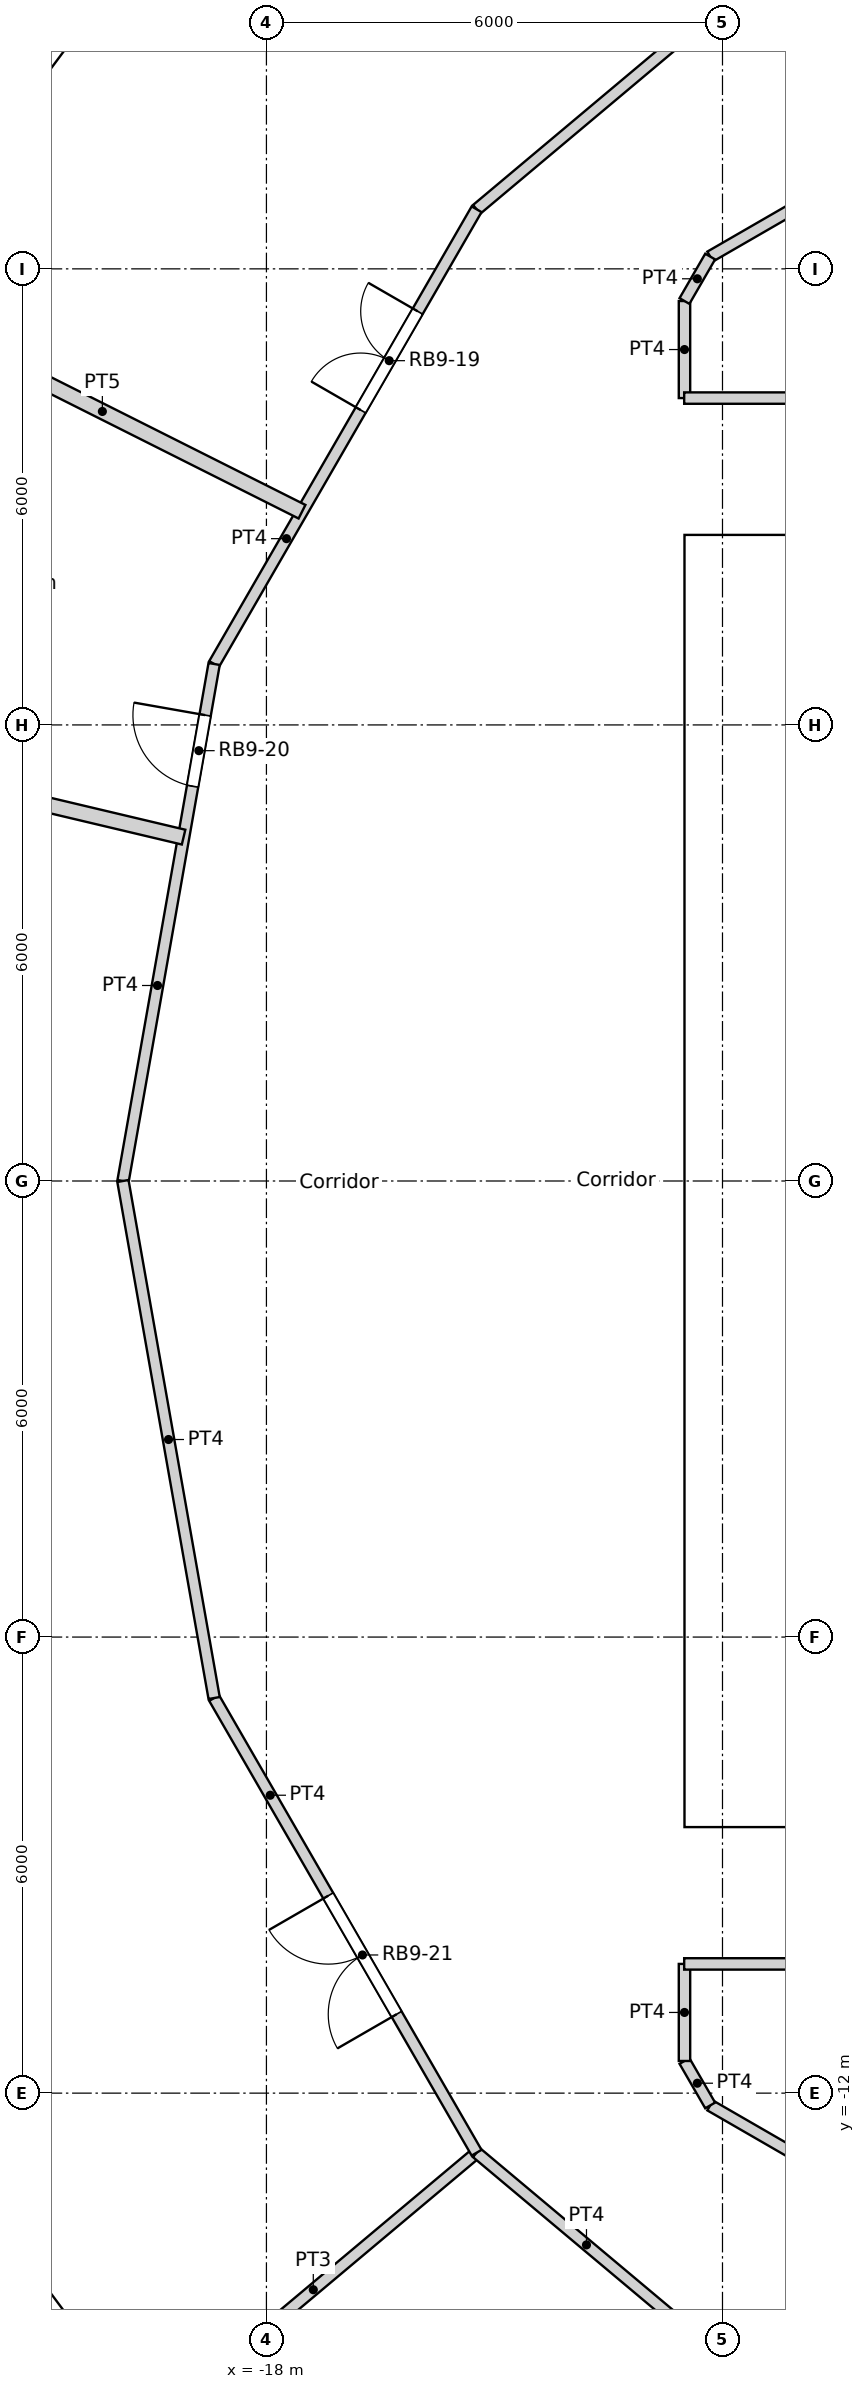
"""IFC4 building model, lengths in metres.
Left out: names, types, materials, properties, quantities, classifications, styles, units other than length and angle.
Written with IfcOpenShell. Run it as: python <this file> out.ifc"""

import sys

from ifc_helpers import new_model, si_unit, direction, frame, frame_2d, origin, origin_2d, place, context, subcontext, project, spatial, rectangle, circle, extrude, element, fill, save


model = new_model("IFC4")
c1 = context("Model", 3, precision=1e-05, world=origin(), true_north=direction((0.0, 1.0)))
c2 = subcontext(c1, "Body", "Model", "MODEL_VIEW")
j1 = project(units=[si_unit("LENGTHUNIT", "METRE"), si_unit("PLANEANGLEUNIT", "RADIAN")], contexts=[c1])
p1 = place(None, origin())
s1 = spatial("IfcSite", under=j1, at=p1, CompositionType="ELEMENT")
p2 = place(p1, origin())
s2 = spatial("IfcBuilding", under=s1, at=p2, CompositionType="ELEMENT")
p3 = place(p2, frame((0.0, 0.0, 212.4)))
s3 = spatial("IfcBuildingStorey", under=s2, at=p3, CompositionType="ELEMENT", Elevation=212.4)
for number, where, z_axis, x_axis in (
    (1, (-20.509, 13.489, 0.0), (0.0, 0.0, 1.0), (1.0, 0.0, 0.0)),
    (2, (-20.509, -13.489, 0.0), (0.0, 0.0, 1.0), (1.0, 0.0, 0.0)),
):
    element("IfcColumn", number, at=place(p3, frame(where, z_axis=z_axis, x_axis=x_axis)), inside=s3, PredefinedType="COLUMN", context=c2, shape_type="SweptSolid", body=[
        extrude(circle(Radius=0.6, at=origin_2d()), origin(), (0.0, 0.0, 1.0), 3.6),
    ])
for number, where, z_axis, x_axis in (
    (3, (-13.798, 12.802, 0.0), (0.0, 0.0, 1.0), (1.0, 0.0, 0.0)),
    (4, (-16.958, 8.167, 0.0), (0.0, 0.0, 1.0), (1.0, 0.0, 0.0)),
    (5, (-18.612, 2.805, 0.0), (0.0, 0.0, 1.0), (1.0, 0.0, 0.0)),
    (6, (-18.612, -2.805, 0.0), (0.0, 0.0, 1.0), (1.0, 0.0, 0.0)),
    (7, (-16.958, -8.167, 0.0), (0.0, 0.0, 1.0), (1.0, 0.0, 0.0)),
    (8, (-13.798, -12.802, 0.0), (0.0, 0.0, 1.0), (1.0, 0.0, 0.0)),
):
    element("IfcColumn", number, at=place(p3, frame(where, z_axis=z_axis, x_axis=x_axis)), inside=s3, PredefinedType="COLUMN", context=c2, shape_type="SweptSolid", body=[
        extrude(circle(Radius=0.65, at=origin_2d()), origin(), (0.0, 0.0, 1.0), 3.6),
    ])
p4 = place(p3, frame((-19.647, 16.486, 0.0), z_axis=(0.0, 0.0, 1.0), x_axis=(-0.597197580538, -0.80209416517, 0.0)))
e9 = element("IfcWall", 9, at=p4, inside=s3, PredefinedType="SOLIDWALL", context=c2, shape_type="SweptSolid", body=[
    extrude(rectangle(XDim=2.973, YDim=0.3, at=frame_2d((1.486, 0.0))), origin(), (0.0, 0.0, 1.0), 3.3),
])
p5 = place(p4, frame((1.486, 0.0, 1.55)))
e10 = element("IfcOpeningElement", 10, at=p5, cuts=e9, PredefinedType="OPENING", context=c2, shape_type="SweptSolid", body=[
    extrude(circle(Radius=0.9, at=origin_2d()), frame((0.0, 0.16, 0.0), z_axis=(0.0, -1.0, 0.0), x_axis=(1.0, 0.0, 0.0)), (0.0, 0.0, 1.0), 0.32),
])
p6 = place(p3, frame((-21.422, -14.101, 0.0), z_axis=(0.0, 0.0, 1.0), x_axis=(0.597197580538, -0.80209416517, 0.0)))
e11 = element("IfcWall", 11, at=p6, inside=s3, PredefinedType="SOLIDWALL", context=c2, shape_type="SweptSolid", body=[
    extrude(rectangle(XDim=2.973, YDim=0.3, at=frame_2d((1.486, 0.0))), origin(), (0.0, 0.0, 1.0), 3.3),
])
p7 = place(p6, frame((1.486, 0.0, 1.55)))
e12 = element("IfcOpeningElement", 12, at=p7, cuts=e11, PredefinedType="OPENING", context=c2, shape_type="SweptSolid", body=[
    extrude(circle(Radius=0.9, at=origin_2d()), frame((0.0, 0.16, 0.0), z_axis=(0.0, -1.0, 0.0), x_axis=(1.0, 0.0, 0.0)), (0.0, 0.0, 1.0), 0.32),
])
p8 = place(p3, frame((-12.5, -8.05, 0.0), z_axis=(0.0, 0.0, 1.0), x_axis=(1.0, 0.0, 0.0)))
e13 = element("IfcWall", 13, at=p8, inside=s3, PredefinedType="SOLIDWALL", context=c2, shape_type="SweptSolid", body=[
    extrude(rectangle(XDim=25.0, YDim=0.9, at=frame_2d((12.5, 0.0))), origin(), (0.0, 0.0, 1.0), 3.6),
])
p9 = place(p8, frame((13.4, 0.0, 0.0)))
e14 = element("IfcOpeningElement", 14, at=p9, cuts=e13, PredefinedType="OPENING", context=c2, shape_type="SweptSolid", body=[
    extrude(rectangle(XDim=1.0, YDim=2.1, at=frame_2d((0.5, 1.05))), frame((0.0, 0.45, 0.0), z_axis=(0.0, -1.0, 0.0), x_axis=(1.0, 0.0, 0.0)), (0.0, 0.0, 1.0), 0.9),
])
p10 = place(p8, frame((8.3, 0.0, 0.0)))
e15 = element("IfcOpeningElement", 15, at=p10, cuts=e13, PredefinedType="OPENING", context=c2, shape_type="SweptSolid", body=[
    extrude(rectangle(XDim=1.8, YDim=2.1, at=frame_2d((0.9, 1.05))), frame((0.0, 0.45, 0.0), z_axis=(0.0, -1.0, 0.0), x_axis=(1.0, 0.0, 0.0)), (0.0, 0.0, 1.0), 0.9),
])
p11 = place(p8, frame((14.9, 0.0, 0.0)))
e16 = element("IfcOpeningElement", 16, at=p11, cuts=e13, PredefinedType="OPENING", context=c2, shape_type="SweptSolid", body=[
    extrude(rectangle(XDim=1.8, YDim=2.1, at=frame_2d((0.9, 1.05))), frame((0.0, 0.45, 0.0), z_axis=(0.0, -1.0, 0.0), x_axis=(1.0, 0.0, 0.0)), (0.0, 0.0, 1.0), 0.9),
])
p12 = place(p3, frame((-12.5, 8.05, 0.0), z_axis=(0.0, 0.0, 1.0), x_axis=(1.0, 0.0, 0.0)))
e17 = element("IfcWall", 17, at=p12, inside=s3, PredefinedType="SOLIDWALL", context=c2, shape_type="SweptSolid", body=[
    extrude(rectangle(XDim=25.0, YDim=0.9, at=frame_2d((12.5, 0.0))), origin(), (0.0, 0.0, 1.0), 3.6),
])
p13 = place(p12, frame((8.3, 0.0, 0.0)))
e18 = element("IfcOpeningElement", 18, at=p13, cuts=e17, PredefinedType="OPENING", context=c2, shape_type="SweptSolid", body=[
    extrude(rectangle(XDim=1.8, YDim=2.1, at=frame_2d((0.9, 1.05))), frame((0.0, 0.45, 0.0), z_axis=(0.0, -1.0, 0.0), x_axis=(1.0, 0.0, 0.0)), (0.0, 0.0, 1.0), 0.9),
])
p14 = place(p3, frame((-12.05, -7.6, 0.0), z_axis=(0.0, 0.0, 1.0), x_axis=(0.0, 1.0, 0.0)))
e19 = element("IfcWall", 19, at=p14, inside=s3, PredefinedType="SOLIDWALL", context=c2, shape_type="SweptSolid", body=[
    extrude(rectangle(XDim=15.2, YDim=0.9, at=frame_2d((7.6, 0.0))), origin(), (0.0, 0.0, 1.0), 3.6),
])
p15 = place(p14, frame((7.1, 0.0, 0.0)))
e20 = element("IfcOpeningElement", 20, at=p15, cuts=e19, PredefinedType="OPENING", context=c2, shape_type="SweptSolid", body=[
    extrude(rectangle(XDim=1.0, YDim=2.1, at=frame_2d((0.5, 1.05))), frame((0.0, 0.45, 0.0), z_axis=(0.0, -1.0, 0.0), x_axis=(1.0, 0.0, 0.0)), (0.0, 0.0, 1.0), 0.9),
])
p16 = place(p3, frame((-11.6, -4.55, 0.0), z_axis=(0.0, 0.0, 1.0), x_axis=(1.0, 0.0, 0.0)))
e21 = element("IfcWall", 21, at=p16, inside=s3, PredefinedType="SOLIDWALL", context=c2, shape_type="SweptSolid", body=[
    extrude(rectangle(XDim=2.4, YDim=0.3, at=frame_2d((1.2, 0.0))), origin(), (0.0, 0.0, 1.0), 3.3),
])
p17 = place(p16, frame((0.65, 0.0, 0.0)))
e22 = element("IfcOpeningElement", 22, at=p17, cuts=e21, PredefinedType="OPENING", context=c2, shape_type="SweptSolid", body=[
    extrude(rectangle(XDim=1.1, YDim=2.1, at=frame_2d((0.55, 1.05))), frame((0.0, 0.15, 0.0), z_axis=(0.0, -1.0, 0.0), x_axis=(1.0, 0.0, 0.0)), (0.0, 0.0, 1.0), 0.3),
])
p18 = place(p3, frame((-11.6, 4.55, 0.0), z_axis=(0.0, 0.0, 1.0), x_axis=(1.0, 0.0, 0.0)))
e23 = element("IfcWall", 23, at=p18, inside=s3, PredefinedType="SOLIDWALL", context=c2, shape_type="SweptSolid", body=[
    extrude(rectangle(XDim=2.4, YDim=0.3, at=frame_2d((1.2, 0.0))), origin(), (0.0, 0.0, 1.0), 3.3),
])
p19 = place(p18, frame((0.65, 0.0, 0.0)))
e24 = element("IfcOpeningElement", 24, at=p19, cuts=e23, PredefinedType="OPENING", context=c2, shape_type="SweptSolid", body=[
    extrude(rectangle(XDim=1.1, YDim=2.1, at=frame_2d((0.55, 1.05))), frame((0.0, 0.15, 0.0), z_axis=(0.0, -1.0, 0.0), x_axis=(1.0, 0.0, 0.0)), (0.0, 0.0, 1.0), 0.3),
])
for number, where, z_axis, x_axis in (
    (25, (-12.504, 10.3, 0.0), (0.0, 0.0, 1.0), (1.0, 0.0, 0.0)),
    (26, (-12.504, -10.3, 0.0), (0.0, 0.0, 1.0), (1.0, 0.0, 0.0)),
):
    element("IfcWall", number, at=place(p3, frame(where, z_axis=z_axis, x_axis=x_axis)), inside=s3, PredefinedType="PARTITIONING", context=c2, shape_type="SweptSolid", body=[
        extrude(rectangle(XDim=7.687, YDim=0.15, at=frame_2d((3.844, 0.0))), origin(), (0.0, 0.0, 1.0), 3.15),
    ])
p20 = place(p3, frame((-12.162, 12.162, 0.0), z_axis=(0.0, 0.0, 1.0), x_axis=(0.866004766557, 0.500035743023, 0.0)))
e27 = element("IfcWall", 27, at=p20, inside=s3, PredefinedType="PARTITIONING", context=c2, shape_type="SweptSolid", body=[
    extrude(rectangle(XDim=8.477, YDim=0.15, at=frame_2d((4.239, 0.0))), origin(), (0.0, 0.0, 1.0), 3.15),
])
p21 = place(p20, frame((3.739, 0.0, 0.0)))
e28 = element("IfcOpeningElement", 28, at=p21, cuts=e27, PredefinedType="OPENING", context=c2, shape_type="SweptSolid", body=[
    extrude(rectangle(XDim=1.0, YDim=2.04, at=frame_2d((0.5, 1.02))), frame((0.0, 0.075, 0.0), z_axis=(0.0, -1.0, 0.0), x_axis=(1.0, 0.0, 0.0)), (0.0, 0.0, 1.0), 0.15),
])
p22 = place(p3, frame((-15.234, 12.783, 0.0), z_axis=(0.0, 0.0, 1.0), x_axis=(0.765936018543, 0.642916802937, 0.0)))
e29 = element("IfcWall", 29, at=p22, inside=s3, PredefinedType="PARTITIONING", context=c2, shape_type="SweptSolid", body=[
    extrude(rectangle(XDim=6.906, YDim=0.15, at=frame_2d((3.453, 0.0))), origin(), (0.0, 0.0, 1.0), 3.15),
])
p23 = place(p3, frame((-12.5, 11.577, 0.0), z_axis=(0.0, 0.0, 1.0), x_axis=(0.500024767483, 0.866011103799, 0.0)))
e30 = element("IfcWall", 30, at=p23, inside=s3, PredefinedType="PARTITIONING", context=c2, shape_type="SweptSolid", body=[
    extrude(rectangle(XDim=0.676, YDim=0.15, at=frame_2d((0.338, 0.0))), origin(), (0.0, 0.0, 1.0), 3.15),
])
for number, where, z_axis, x_axis in (
    (31, (-12.5, 10.3, 0.0), (0.0, 0.0, 1.0), (0.0, 1.0, 0.0)),
    (32, (-12.5, -11.577, 0.0), (0.0, 0.0, 1.0), (0.0, 1.0, 0.0)),
):
    element("IfcWall", number, at=place(p3, frame(where, z_axis=z_axis, x_axis=x_axis)), inside=s3, PredefinedType="PARTITIONING", context=c2, shape_type="SweptSolid", body=[
        extrude(rectangle(XDim=1.277, YDim=0.15, at=frame_2d((0.638, 0.0))), origin(), (0.0, 0.0, 1.0), 3.15),
    ])
p24 = place(p3, frame((-12.5, -11.577, 0.0), z_axis=(0.0, 0.0, 1.0), x_axis=(0.500024767483, -0.866011103799, 0.0)))
e33 = element("IfcWall", 33, at=p24, inside=s3, PredefinedType="PARTITIONING", context=c2, shape_type="SweptSolid", body=[
    extrude(rectangle(XDim=0.676, YDim=0.15, at=frame_2d((0.338, 0.0))), origin(), (0.0, 0.0, 1.0), 3.15),
])
p25 = place(p3, frame((-18.688, 6.802, 0.0), z_axis=(0.0, 0.0, 1.0), x_axis=(0.499914202267, 0.866074933462, 0.0)))
e34 = element("IfcWall", 34, at=p25, inside=s3, PredefinedType="PARTITIONING", context=c2, shape_type="SweptSolid", body=[
    extrude(rectangle(XDim=6.907, YDim=0.15, at=frame_2d((3.454, 0.0))), origin(), (0.0, 0.0, 1.0), 3.15),
])
p26 = place(p25, frame((3.857, 0.0, 0.0)))
e35 = element("IfcOpeningElement", 35, at=p26, cuts=e34, PredefinedType="OPENING", context=c2, shape_type="SweptSolid", body=[
    extrude(rectangle(XDim=1.5, YDim=2.1, at=frame_2d((0.75, 1.05))), frame((0.0, 0.075, 0.0), z_axis=(0.0, -1.0, 0.0), x_axis=(1.0, 0.0, 0.0)), (0.0, 0.0, 1.0), 0.15),
])
p27 = place(p3, frame((-19.886, -0.0, 0.0), z_axis=(0.0, 0.0, 1.0), x_axis=(0.173482860149, 0.984836888644, 0.0)))
e36 = element("IfcWall", 36, at=p27, inside=s3, PredefinedType="PARTITIONING", context=c2, shape_type="SweptSolid", body=[
    extrude(rectangle(XDim=6.907, YDim=0.15, at=frame_2d((3.454, 0.0))), origin(), (0.0, 0.0, 1.0), 3.15),
])
p28 = place(p27, frame((5.274, 0.0, 0.0)))
e37 = element("IfcOpeningElement", 37, at=p28, cuts=e36, PredefinedType="OPENING", context=c2, shape_type="SweptSolid", body=[
    extrude(rectangle(XDim=0.95, YDim=2.1, at=frame_2d((0.475, 1.05))), frame((0.0, 0.075, 0.0), z_axis=(0.0, -1.0, 0.0), x_axis=(1.0, 0.0, 0.0)), (0.0, 0.0, 1.0), 0.15),
])
p29 = place(p3, frame((-18.688, -6.802, 0.0), z_axis=(0.0, 0.0, 1.0), x_axis=(0.499914202267, -0.866074933462, 0.0)))
e38 = element("IfcWall", 38, at=p29, inside=s3, PredefinedType="PARTITIONING", context=c2, shape_type="SweptSolid", body=[
    extrude(rectangle(XDim=6.907, YDim=0.15, at=frame_2d((3.454, 0.0))), origin(), (0.0, 0.0, 1.0), 3.15),
])
p30 = place(p29, frame((3.003, 0.0, 0.0)))
e39 = element("IfcOpeningElement", 39, at=p30, cuts=e38, PredefinedType="OPENING", context=c2, shape_type="SweptSolid", body=[
    extrude(rectangle(XDim=1.8, YDim=2.1, at=frame_2d((0.9, 1.05))), frame((0.0, 0.075, 0.0), z_axis=(0.0, -1.0, 0.0), x_axis=(1.0, 0.0, 0.0)), (0.0, 0.0, 1.0), 0.15),
])
p31 = place(p3, frame((-19.888, 0.0, 0.0), z_axis=(0.0, 0.0, 1.0), x_axis=(0.173728873845, -0.98479352069, 0.0)))
e40 = element("IfcWall", 40, at=p31, inside=s3, PredefinedType="PARTITIONING", context=c2, shape_type="SweptSolid", body=[
    extrude(rectangle(XDim=6.907, YDim=0.15, at=frame_2d((3.454, 0.0))), origin(), (0.0, 0.0, 1.0), 3.15),
])
p32 = place(p3, frame((-15.235, -12.784, 0.0), z_axis=(0.0, 0.0, 1.0), x_axis=(0.766192104565, -0.642611592567, 0.0)))
e41 = element("IfcWall", 41, at=p32, inside=s3, PredefinedType="PARTITIONING", context=c2, shape_type="SweptSolid", body=[
    extrude(rectangle(XDim=6.906, YDim=0.15, at=frame_2d((3.453, 0.0))), origin(), (0.0, 0.0, 1.0), 3.15),
])
p33 = place(p32, frame((3.823, 0.0, 0.0)))
e42 = element("IfcOpeningElement", 42, at=p33, cuts=e41, PredefinedType="OPENING", context=c2, shape_type="SweptSolid", body=[
    extrude(rectangle(XDim=1.0, YDim=2.04, at=frame_2d((0.5, 1.02))), frame((0.0, 0.075, 0.0), z_axis=(0.0, -1.0, 0.0), x_axis=(1.0, 0.0, 0.0)), (0.0, 0.0, 1.0), 0.15),
])
p34 = place(p3, frame((-12.162, -12.162, 0.0), z_axis=(0.0, 0.0, 1.0), x_axis=(0.866004766557, -0.500035743023, 0.0)))
e43 = element("IfcWall", 43, at=p34, inside=s3, PredefinedType="PARTITIONING", context=c2, shape_type="SweptSolid", body=[
    extrude(rectangle(XDim=8.477, YDim=0.15, at=frame_2d((4.239, 0.0))), origin(), (0.0, 0.0, 1.0), 3.15),
])
p35 = place(p34, frame((3.763, 0.0, 0.0)))
e44 = element("IfcOpeningElement", 44, at=p35, cuts=e43, PredefinedType="OPENING", context=c2, shape_type="SweptSolid", body=[
    extrude(rectangle(XDim=0.95, YDim=2.1, at=frame_2d((0.475, 1.05))), frame((0.0, 0.075, 0.0), z_axis=(0.0, -1.0, 0.0), x_axis=(1.0, 0.0, 0.0)), (0.0, 0.0, 1.0), 0.15),
])
p36 = place(p3, frame((-22.785, 11.443, 0.0), z_axis=(0.0, 0.0, 1.0), x_axis=(0.893628331628, -0.448807759415, 0.0)))
e45 = element("IfcWall", 45, at=p36, inside=s3, PredefinedType="PARTITIONING", context=c2, shape_type="SweptSolid", body=[
    extrude(rectangle(XDim=5.878, YDim=0.2, at=frame_2d((2.939, 0.0))), origin(), (0.0, 0.0, 1.0), 3.15),
])
p37 = place(p3, frame((-24.81, 5.88, 0.0), z_axis=(0.0, 0.0, 1.0), x_axis=(0.973033452951, -0.230664040193, 0.0)))
e46 = element("IfcWall", 46, at=p37, inside=s3, PredefinedType="PARTITIONING", context=c2, shape_type="SweptSolid", body=[
    extrude(rectangle(XDim=5.878, YDim=0.2, at=frame_2d((2.939, 0.0))), origin(), (0.0, 0.0, 1.0), 3.15),
])
p38 = place(p3, frame((-19.532, -16.389, 0.0), z_axis=(0.0, 0.0, 1.0), x_axis=(0.76609059793, 0.642732600514, 0.0)))
e47 = element("IfcWall", 47, at=p38, inside=s3, PredefinedType="PARTITIONING", context=c2, shape_type="SweptSolid", body=[
    extrude(rectangle(XDim=5.609, YDim=0.15, at=frame_2d((2.804, 0.0))), origin(), (0.0, 0.0, 1.0), 3.15),
])
p39 = place(p5, origin())
e48 = element("IfcWindow", 48, at=p39, inside=s3, PartitioningType="SINGLE_PANEL", PredefinedType="WINDOW", context=c2, shape_type="SweptSolid", body=[
    extrude(circle(Radius=0.9, at=origin_2d()), frame((0.0, 0.12, 0.0), z_axis=(0.0, -1.0, 0.0), x_axis=(1.0, 0.0, 0.0)), (0.0, 0.0, 1.0), 0.1),
])
fill(e10, e48)
p40 = place(p7, origin())
e49 = element("IfcWindow", 49, at=p40, inside=s3, PartitioningType="SINGLE_PANEL", PredefinedType="WINDOW", context=c2, shape_type="SweptSolid", body=[
    extrude(circle(Radius=0.9, at=origin_2d()), frame((0.0, 0.12, 0.0), z_axis=(0.0, -1.0, 0.0), x_axis=(1.0, 0.0, 0.0)), (0.0, 0.0, 1.0), 0.1),
])
fill(e12, e49)
p41 = place(p15, origin())
e50 = element("IfcDoor", 50, at=p41, inside=s3, OperationType="DOUBLE_DOOR_SINGLE_SWING", PredefinedType="DOOR", context=c2, shape_type="SweptSolid", body=[
    extrude(rectangle(XDim=1.0, YDim=2.1, at=frame_2d((0.5, 1.05))), frame((0.0, 0.025, 0.0), z_axis=(0.0, -1.0, 0.0), x_axis=(1.0, 0.0, 0.0)), (0.0, 0.0, 1.0), 0.05),
])
fill(e20, e50)
p42 = place(p26, origin())
e51 = element("IfcDoor", 51, at=p42, inside=s3, OperationType="DOUBLE_DOOR_SINGLE_SWING", PredefinedType="DOOR", context=c2, shape_type="SweptSolid", body=[
    extrude(rectangle(XDim=1.5, YDim=2.1, at=frame_2d((0.75, 1.05))), frame((0.0, 0.025, 0.0), z_axis=(0.0, -1.0, 0.0), x_axis=(1.0, 0.0, 0.0)), (0.0, 0.0, 1.0), 0.05),
])
fill(e35, e51)
p43 = place(p28, origin())
e52 = element("IfcDoor", 52, at=p43, inside=s3, OperationType="SINGLE_SWING_RIGHT", PredefinedType="DOOR", context=c2, shape_type="SweptSolid", body=[
    extrude(rectangle(XDim=0.95, YDim=2.1, at=frame_2d((0.475, 1.05))), frame((0.0, 0.025, 0.0), z_axis=(0.0, -1.0, 0.0), x_axis=(1.0, 0.0, 0.0)), (0.0, 0.0, 1.0), 0.05),
])
fill(e37, e52)
p44 = place(p30, origin())
e53 = element("IfcDoor", 53, at=p44, inside=s3, OperationType="DOUBLE_DOOR_SINGLE_SWING", PredefinedType="DOOR", context=c2, shape_type="SweptSolid", body=[
    extrude(rectangle(XDim=1.8, YDim=2.1, at=frame_2d((0.9, 1.05))), frame((0.0, 0.025, 0.0), z_axis=(0.0, -1.0, 0.0), x_axis=(1.0, 0.0, 0.0)), (0.0, 0.0, 1.0), 0.05),
])
fill(e39, e53)
save(model, sys.argv[1])
